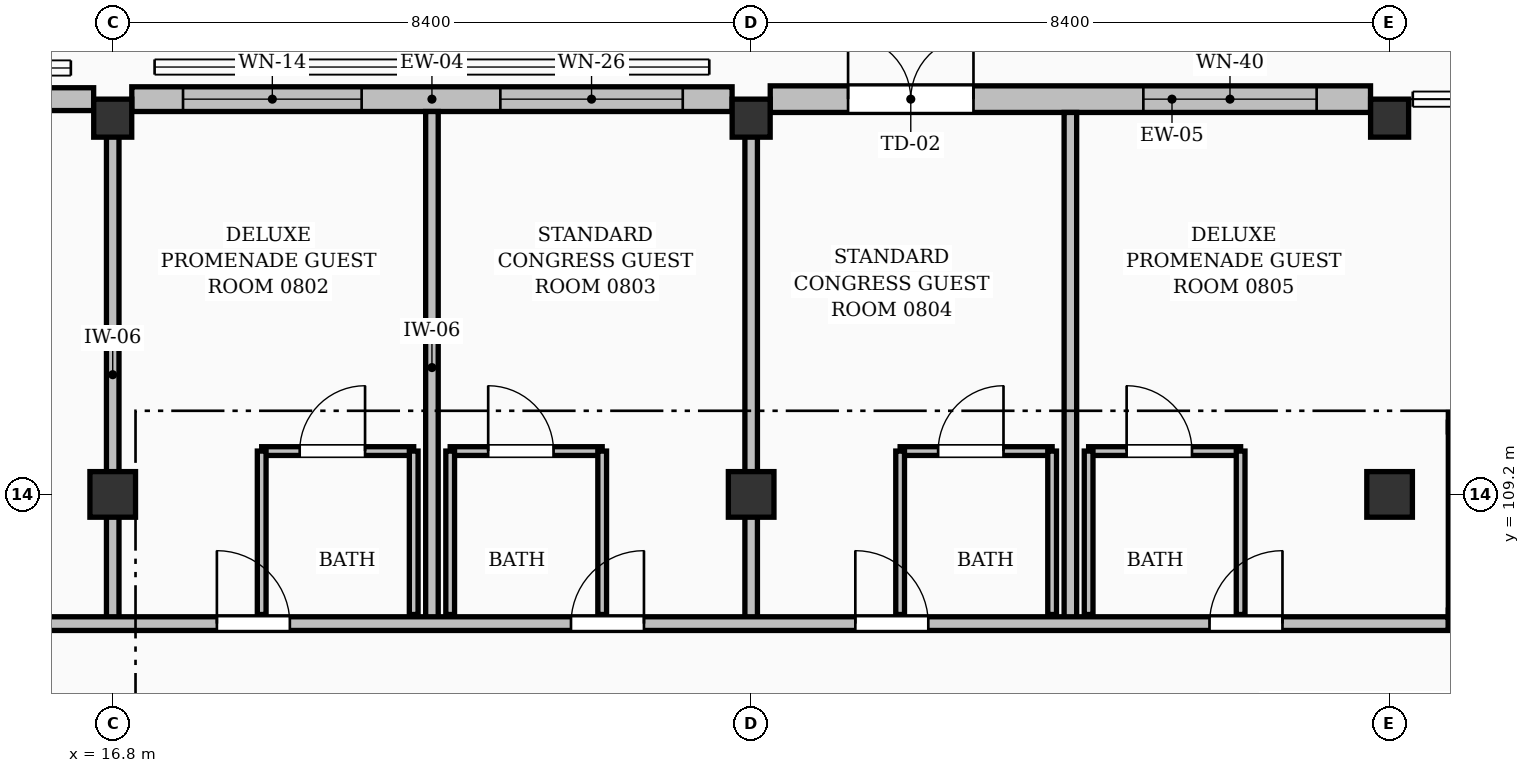
"""IFC4 building model, lengths in metres.
Left out: names, types, materials, properties, quantities, classifications, styles, units other than length and angle.
Written with IfcOpenShell. Run it as: python <this file> out.ifc"""

import sys

from ifc_helpers import new_model, si_unit, direction, frame, frame_2d, origin, origin_2d, place, context, subcontext, project, spatial, rectangle, extrude, element, fill, save


model = new_model("IFC4")
c1 = context("Model", 3, precision=1e-05, world=origin(), true_north=direction((0.0, 1.0)))
c2 = subcontext(c1, "Body", "Model", "MODEL_VIEW")
j1 = project(units=[si_unit("LENGTHUNIT", "METRE"), si_unit("PLANEANGLEUNIT", "RADIAN")], contexts=[c1])
p1 = place(None, origin())
s1 = spatial("IfcSite", under=j1, at=p1, CompositionType="ELEMENT")
p2 = place(p1, origin())
s2 = spatial("IfcBuilding", under=s1, at=p2, CompositionType="ELEMENT")
p3 = place(p2, frame((0.0, 0.0, 28.56)))
s3 = spatial("IfcBuildingStorey", under=s2, at=p3, CompositionType="ELEMENT", Elevation=28.56)
p4 = place(p3, frame((16.8, 109.2, 0.0), z_axis=(0.0, 0.0, 1.0), x_axis=(1.0, 0.0, 0.0)))
e1 = element("IfcColumn", 1, at=p4, inside=s3, PredefinedType="COLUMN", context=c2, shape_type="SweptSolid", body=[
    extrude(rectangle(XDim=0.6, YDim=0.6, at=origin_2d()), origin(), (0.0, 0.0, 1.0), 3.36),
])
p5 = place(p3, frame((16.8, 114.15, -0.315), z_axis=(0.0, 0.0, 1.0), x_axis=(1.0, 0.0, 0.0)))
e2 = element("IfcColumn", 2, at=p5, inside=s3, PredefinedType="COLUMN", context=c2, shape_type="SweptSolid", body=[
    extrude(rectangle(XDim=0.5, YDim=0.5, at=origin_2d()), origin(), (0.0, 0.0, 1.0), 3.675),
])
p6 = place(p3, frame((25.2, 109.2, 0.0), z_axis=(0.0, 0.0, 1.0), x_axis=(1.0, 0.0, 0.0)))
e3 = element("IfcColumn", 3, at=p6, inside=s3, PredefinedType="COLUMN", context=c2, shape_type="SweptSolid", body=[
    extrude(rectangle(XDim=0.6, YDim=0.6, at=origin_2d()), origin(), (0.0, 0.0, 1.0), 3.36),
])
p7 = place(p3, frame((25.2, 114.15, -0.315), z_axis=(0.0, 0.0, 1.0), x_axis=(1.0, 0.0, 0.0)))
e4 = element("IfcColumn", 4, at=p7, inside=s3, PredefinedType="COLUMN", context=c2, shape_type="SweptSolid", body=[
    extrude(rectangle(XDim=0.5, YDim=0.5, at=origin_2d()), origin(), (0.0, 0.0, 1.0), 3.675),
])
p8 = place(p3, frame((33.6, 109.2, 0.0), z_axis=(0.0, 0.0, 1.0), x_axis=(1.0, 0.0, 0.0)))
e5 = element("IfcColumn", 5, at=p8, inside=s3, PredefinedType="COLUMN", context=c2, shape_type="SweptSolid", body=[
    extrude(rectangle(XDim=0.6, YDim=0.6, at=origin_2d()), origin(), (0.0, 0.0, 1.0), 3.36),
])
p9 = place(p3, frame((33.6, 114.15, -0.315), z_axis=(0.0, 0.0, 1.0), x_axis=(1.0, 0.0, 0.0)))
e6 = element("IfcColumn", 6, at=p9, inside=s3, PredefinedType="COLUMN", context=c2, shape_type="SweptSolid", body=[
    extrude(rectangle(XDim=0.5, YDim=0.5, at=origin_2d()), origin(), (0.0, 0.0, 1.0), 3.675),
])
p10 = place(p3, frame((8.651, 114.4, 0.0), z_axis=(0.0, 0.0, 1.0), x_axis=(1.0, 0.0, 0.0)))
e7 = element("IfcWall", 7, at=p10, inside=s3, PredefinedType="SOLIDWALL", context=c2, shape_type="SweptSolid", body=[
    extrude(rectangle(XDim=7.898, YDim=0.3, at=frame_2d((3.949, 0.0))), origin(), (0.0, 0.0, 1.0), 2.494),
])
p11 = place(p10, frame((0.524, 0.0, 0.25)))
e8 = element("IfcOpeningElement", 8, at=p11, cuts=e7, PredefinedType="OPENING", context=c2, shape_type="SweptSolid", body=[
    extrude(rectangle(XDim=2.65, YDim=1.95, at=frame_2d((1.325, 0.975))), frame((0.0, 0.16, 0.0), z_axis=(0.0, -1.0, 0.0), x_axis=(1.0, 0.0, 0.0)), (0.0, 0.0, 1.0), 0.32),
])
p12 = place(p10, frame((4.824, 0.0, 0.25)))
e9 = element("IfcOpeningElement", 9, at=p12, cuts=e7, PredefinedType="OPENING", context=c2, shape_type="SweptSolid", body=[
    extrude(rectangle(XDim=2.45, YDim=2.05, at=frame_2d((1.225, 1.025))), frame((0.0, 0.16, 0.0), z_axis=(0.0, -1.0, 0.0), x_axis=(1.0, 0.0, 0.0)), (0.0, 0.0, 1.0), 0.32),
])
p13 = place(p3, frame((17.051, 114.4, 0.0), z_axis=(0.0, 0.0, 1.0), x_axis=(1.0, 0.0, 0.0)))
e10 = element("IfcWall", 10, at=p13, inside=s3, PredefinedType="SOLIDWALL", context=c2, shape_type="SweptSolid", body=[
    extrude(rectangle(XDim=7.898, YDim=0.325, at=frame_2d((3.949, 0.0))), origin(), (0.0, 0.0, 1.0), 2.494),
])
p14 = place(p13, frame((0.674, 0.0, 0.25)))
e11 = element("IfcOpeningElement", 11, at=p14, cuts=e10, PredefinedType="OPENING", context=c2, shape_type="SweptSolid", body=[
    extrude(rectangle(XDim=2.35, YDim=2.05, at=frame_2d((1.175, 1.025))), frame((0.0, 0.172, 0.0), z_axis=(0.0, -1.0, 0.0), x_axis=(1.0, 0.0, 0.0)), (0.0, 0.0, 1.0), 0.345),
])
p15 = place(p13, frame((4.849, 0.0, 0.25)))
e12 = element("IfcOpeningElement", 12, at=p15, cuts=e10, PredefinedType="OPENING", context=c2, shape_type="SweptSolid", body=[
    extrude(rectangle(XDim=2.4, YDim=1.75, at=frame_2d((1.2, 0.875))), frame((0.0, 0.172, 0.0), z_axis=(0.0, -1.0, 0.0), x_axis=(1.0, 0.0, 0.0)), (0.0, 0.0, 1.0), 0.345),
])
p16 = place(p3, frame((25.451, 114.4, 0.0), z_axis=(0.0, 0.0, 1.0), x_axis=(1.0, 0.0, 0.0)))
e13 = element("IfcWall", 13, at=p16, inside=s3, PredefinedType="SOLIDWALL", context=c2, shape_type="SweptSolid", body=[
    extrude(rectangle(XDim=7.898, YDim=0.35, at=frame_2d((3.949, 0.0))), origin(), (0.0, 0.0, 1.0), 2.494),
])
p17 = place(p16, frame((1.024, 0.0, 0.0)))
e14 = element("IfcOpeningElement", 14, at=p17, cuts=e13, PredefinedType="OPENING", context=c2, shape_type="SweptSolid", body=[
    extrude(rectangle(XDim=1.65, YDim=2.08, at=frame_2d((0.825, 1.04))), frame((0.0, 0.185, 0.0), z_axis=(0.0, -1.0, 0.0), x_axis=(1.0, 0.0, 0.0)), (0.0, 0.0, 1.0), 0.37),
])
p18 = place(p16, frame((4.909, 0.0, 0.25)))
e15 = element("IfcOpeningElement", 15, at=p18, cuts=e13, PredefinedType="OPENING", context=c2, shape_type="SweptSolid", body=[
    extrude(rectangle(XDim=2.28, YDim=2.0, at=frame_2d((1.14, 1.0))), frame((0.0, 0.185, 0.0), z_axis=(0.0, -1.0, 0.0), x_axis=(1.0, 0.0, 0.0)), (0.0, 0.0, 1.0), 0.37),
])
p19 = place(p3, frame((34.373, 107.55, 0.0), z_axis=(0.0, 0.0, 1.0), x_axis=(1.0, 0.0, 0.0)))
e16 = element("IfcWall", 16, at=p19, inside=s3, PredefinedType="SOLIDWALL", context=c2, shape_type="SweptSolid", body=[
    extrude(rectangle(XDim=2.455, YDim=0.255, at=frame_2d((1.228, 0.0))), origin(), (0.0, 0.0, 1.0), 3.12),
])
p20 = place(p19, frame((0.677, 0.0, 0.0)))
e17 = element("IfcOpeningElement", 17, at=p20, cuts=e16, PredefinedType="OPENING", context=c2, shape_type="SweptSolid", body=[
    extrude(rectangle(XDim=1.1, YDim=2.15, at=frame_2d((0.55, 1.075))), frame((0.0, 0.137, 0.0), z_axis=(0.0, -1.0, 0.0), x_axis=(1.0, 0.0, 0.0)), (0.0, 0.0, 1.0), 0.275),
])
p21 = place(p3, frame((34.373, 110.15, 0.0), z_axis=(0.0, 0.0, 1.0), x_axis=(1.0, 0.0, 0.0)))
e18 = element("IfcWall", 18, at=p21, inside=s3, PredefinedType="SOLIDWALL", context=c2, shape_type="SweptSolid", body=[
    extrude(rectangle(XDim=2.455, YDim=0.255, at=frame_2d((1.228, 0.0))), origin(), (0.0, 0.0, 1.0), 3.12),
])
p22 = place(p3, frame((34.5, 107.55, 0.0), z_axis=(0.0, 0.0, 1.0), x_axis=(0.0, 1.0, 0.0)))
e19 = element("IfcWall", 19, at=p22, inside=s3, PredefinedType="SOLIDWALL", context=c2, shape_type="SweptSolid", body=[
    extrude(rectangle(XDim=2.6, YDim=0.255, at=frame_2d((1.3, 0.0))), origin(), (0.0, 0.0, 1.0), 3.12),
])
p23 = place(p3, frame((18.76, 109.77, 0.0), z_axis=(0.0, 0.0, 1.0), x_axis=(1.0, 0.0, 0.0)))
e20 = element("IfcWall", 20, at=p23, inside=s3, PredefinedType="PARTITIONING", context=c2, shape_type="SweptSolid", body=[
    extrude(rectangle(XDim=2.0, YDim=0.115, at=frame_2d((1.0, 0.0))), origin(), (0.0, 0.0, 1.0), 3.12),
])
p24 = place(p23, frame((0.5, 0.0, 0.0)))
e21 = element("IfcOpeningElement", 21, at=p24, cuts=e20, PredefinedType="OPENING", context=c2, shape_type="SweptSolid", body=[
    extrude(rectangle(XDim=0.86, YDim=2.05, at=frame_2d((0.43, 1.025))), frame((0.0, 0.067, 0.0), z_axis=(0.0, -1.0, 0.0), x_axis=(1.0, 0.0, 0.0)), (0.0, 0.0, 1.0), 0.135),
])
for number, where, z_axis, x_axis in (
    (22, (18.76, 107.62, 0.0), (0.0, 0.0, 1.0), (0.0, 1.0, 0.0)),
    (23, (20.76, 107.62, 0.0), (0.0, 0.0, 1.0), (0.0, 1.0, 0.0)),
):
    element("IfcWall", number, at=place(p3, frame(where, z_axis=z_axis, x_axis=x_axis)), inside=s3, PredefinedType="PARTITIONING", context=c2, shape_type="SweptSolid", body=[
        extrude(rectangle(XDim=2.15, YDim=0.115, at=frame_2d((1.075, 0.0))), origin(), (0.0, 0.0, 1.0), 3.12),
    ])
p25 = place(p3, frame((21.24, 109.77, 0.0), z_axis=(0.0, 0.0, 1.0), x_axis=(1.0, 0.0, 0.0)))
e24 = element("IfcWall", 24, at=p25, inside=s3, PredefinedType="PARTITIONING", context=c2, shape_type="SweptSolid", body=[
    extrude(rectangle(XDim=2.0, YDim=0.115, at=frame_2d((1.0, 0.0))), origin(), (0.0, 0.0, 1.0), 3.12),
])
p26 = place(p25, frame((0.5, 0.0, 0.0)))
e25 = element("IfcOpeningElement", 25, at=p26, cuts=e24, PredefinedType="OPENING", context=c2, shape_type="SweptSolid", body=[
    extrude(rectangle(XDim=0.86, YDim=2.05, at=frame_2d((0.43, 1.025))), frame((0.0, 0.067, 0.0), z_axis=(0.0, -1.0, 0.0), x_axis=(1.0, 0.0, 0.0)), (0.0, 0.0, 1.0), 0.135),
])
for number, where, z_axis, x_axis in (
    (26, (21.24, 107.62, 0.0), (0.0, 0.0, 1.0), (0.0, 1.0, 0.0)),
    (27, (23.24, 107.62, 0.0), (0.0, 0.0, 1.0), (0.0, 1.0, 0.0)),
):
    element("IfcWall", number, at=place(p3, frame(where, z_axis=z_axis, x_axis=x_axis)), inside=s3, PredefinedType="PARTITIONING", context=c2, shape_type="SweptSolid", body=[
        extrude(rectangle(XDim=2.15, YDim=0.115, at=frame_2d((1.075, 0.0))), origin(), (0.0, 0.0, 1.0), 3.12),
    ])
p27 = place(p3, frame((21.0, 107.5, 0.0), z_axis=(0.0, 0.0, 1.0), x_axis=(0.0, 1.0, 0.0)))
e28 = element("IfcWall", 28, at=p27, inside=s3, PredefinedType="PARTITIONING", context=c2, shape_type="SweptSolid", body=[
    extrude(rectangle(XDim=6.738, YDim=0.165, at=frame_2d((3.369, 0.0))), origin(), (0.0, 0.0, 1.0), 3.12),
])
p28 = place(p3, frame((16.8, 107.5, 0.0), z_axis=(0.0, 0.0, 1.0), x_axis=(0.0, 1.0, 0.0)))
e29 = element("IfcWall", 29, at=p28, inside=s3, PredefinedType="PARTITIONING", context=c2, shape_type="SweptSolid", body=[
    extrude(rectangle(XDim=6.55, YDim=0.165, at=frame_2d((3.275, 0.0))), origin(), (0.0, 0.0, 1.0), 2.41),
])
p29 = place(p3, frame((27.16, 109.77, 0.0), z_axis=(0.0, 0.0, 1.0), x_axis=(1.0, 0.0, 0.0)))
e30 = element("IfcWall", 30, at=p29, inside=s3, PredefinedType="PARTITIONING", context=c2, shape_type="SweptSolid", body=[
    extrude(rectangle(XDim=2.0, YDim=0.115, at=frame_2d((1.0, 0.0))), origin(), (0.0, 0.0, 1.0), 3.12),
])
p30 = place(p29, frame((0.5, 0.0, 0.0)))
e31 = element("IfcOpeningElement", 31, at=p30, cuts=e30, PredefinedType="OPENING", context=c2, shape_type="SweptSolid", body=[
    extrude(rectangle(XDim=0.86, YDim=2.05, at=frame_2d((0.43, 1.025))), frame((0.0, 0.067, 0.0), z_axis=(0.0, -1.0, 0.0), x_axis=(1.0, 0.0, 0.0)), (0.0, 0.0, 1.0), 0.135),
])
p31 = place(p3, frame((27.16, 107.62, 0.0), z_axis=(0.0, 0.0, 1.0), x_axis=(0.0, 1.0, 0.0)))
e32 = element("IfcWall", 32, at=p31, inside=s3, PredefinedType="PARTITIONING", context=c2, shape_type="SweptSolid", body=[
    extrude(rectangle(XDim=2.15, YDim=0.115, at=frame_2d((1.075, 0.0))), origin(), (0.0, 0.0, 1.0), 2.642),
])
p32 = place(p3, frame((29.16, 107.62, 0.0), z_axis=(0.0, 0.0, 1.0), x_axis=(0.0, 1.0, 0.0)))
e33 = element("IfcWall", 33, at=p32, inside=s3, PredefinedType="PARTITIONING", context=c2, shape_type="SweptSolid", body=[
    extrude(rectangle(XDim=2.15, YDim=0.115, at=frame_2d((1.075, 0.0))), origin(), (0.0, 0.0, 1.0), 3.12),
])
p33 = place(p3, frame((29.64, 109.77, 0.0), z_axis=(0.0, 0.0, 1.0), x_axis=(1.0, 0.0, 0.0)))
e34 = element("IfcWall", 34, at=p33, inside=s3, PredefinedType="PARTITIONING", context=c2, shape_type="SweptSolid", body=[
    extrude(rectangle(XDim=2.0, YDim=0.115, at=frame_2d((1.0, 0.0))), origin(), (0.0, 0.0, 1.0), 3.12),
])
p34 = place(p33, frame((0.5, 0.0, 0.0)))
e35 = element("IfcOpeningElement", 35, at=p34, cuts=e34, PredefinedType="OPENING", context=c2, shape_type="SweptSolid", body=[
    extrude(rectangle(XDim=0.86, YDim=2.05, at=frame_2d((0.43, 1.025))), frame((0.0, 0.067, 0.0), z_axis=(0.0, -1.0, 0.0), x_axis=(1.0, 0.0, 0.0)), (0.0, 0.0, 1.0), 0.135),
])
p35 = place(p3, frame((29.64, 107.62, 0.0), z_axis=(0.0, 0.0, 1.0), x_axis=(0.0, 1.0, 0.0)))
e36 = element("IfcWall", 36, at=p35, inside=s3, PredefinedType="PARTITIONING", context=c2, shape_type="SweptSolid", body=[
    extrude(rectangle(XDim=2.15, YDim=0.115, at=frame_2d((1.075, 0.0))), origin(), (0.0, 0.0, 1.0), 3.12),
])
p36 = place(p3, frame((31.64, 107.62, 0.0), z_axis=(0.0, 0.0, 1.0), x_axis=(0.0, 1.0, 0.0)))
e37 = element("IfcWall", 37, at=p36, inside=s3, PredefinedType="PARTITIONING", context=c2, shape_type="SweptSolid", body=[
    extrude(rectangle(XDim=2.15, YDim=0.115, at=frame_2d((1.075, 0.0))), origin(), (0.0, 0.0, 1.0), 2.642),
])
p37 = place(p3, frame((29.4, 107.5, 0.0), z_axis=(0.0, 0.0, 1.0), x_axis=(0.0, 1.0, 0.0)))
e38 = element("IfcWall", 38, at=p37, inside=s3, PredefinedType="PARTITIONING", context=c2, shape_type="SweptSolid", body=[
    extrude(rectangle(XDim=6.725, YDim=0.165, at=frame_2d((3.363, 0.0))), origin(), (0.0, 0.0, 1.0), 3.12),
])
p38 = place(p3, frame((25.2, 107.5, 0.0), z_axis=(0.0, 0.0, 1.0), x_axis=(0.0, 1.0, 0.0)))
e39 = element("IfcWall", 39, at=p38, inside=s3, PredefinedType="PARTITIONING", context=c2, shape_type="SweptSolid", body=[
    extrude(rectangle(XDim=6.55, YDim=0.165, at=frame_2d((3.275, 0.0))), origin(), (0.0, 0.0, 1.0), 2.41),
])
p39 = place(p3, frame((8.562, 107.5, 0.0), z_axis=(0.0, 0.0, 1.0), x_axis=(1.0, 0.0, 0.0)))
e40 = element("IfcWall", 40, at=p39, inside=s3, PredefinedType="PARTITIONING", context=c2, shape_type="SweptSolid", body=[
    extrude(rectangle(XDim=25.808, YDim=0.18, at=frame_2d((12.904, 0.0))), origin(), (0.0, 0.0, 1.0), 3.12),
])
p40 = place(p39, frame((1.338, 0.0, 0.0)))
e41 = element("IfcOpeningElement", 41, at=p40, cuts=e40, PredefinedType="OPENING", context=c2, shape_type="SweptSolid", body=[
    extrude(rectangle(XDim=1.02, YDim=2.15, at=frame_2d((0.51, 1.075))), frame((0.0, 0.1, 0.0), z_axis=(0.0, -1.0, 0.0), x_axis=(1.0, 0.0, 0.0)), (0.0, 0.0, 1.0), 0.2),
])
p41 = place(p39, frame((9.608, 0.0, 0.0)))
e42 = element("IfcOpeningElement", 42, at=p41, cuts=e40, PredefinedType="OPENING", context=c2, shape_type="SweptSolid", body=[
    extrude(rectangle(XDim=0.96, YDim=2.15, at=frame_2d((0.48, 1.075))), frame((0.0, 0.1, 0.0), z_axis=(0.0, -1.0, 0.0), x_axis=(1.0, 0.0, 0.0)), (0.0, 0.0, 1.0), 0.2),
])
p42 = place(p39, frame((14.267, 0.0, 0.0)))
e43 = element("IfcOpeningElement", 43, at=p42, cuts=e40, PredefinedType="OPENING", context=c2, shape_type="SweptSolid", body=[
    extrude(rectangle(XDim=0.96, YDim=2.15, at=frame_2d((0.48, 1.075))), frame((0.0, 0.1, 0.0), z_axis=(0.0, -1.0, 0.0), x_axis=(1.0, 0.0, 0.0)), (0.0, 0.0, 1.0), 0.2),
])
p43 = place(p39, frame((18.008, 0.0, 0.0)))
e44 = element("IfcOpeningElement", 44, at=p43, cuts=e40, PredefinedType="OPENING", context=c2, shape_type="SweptSolid", body=[
    extrude(rectangle(XDim=0.96, YDim=2.15, at=frame_2d((0.48, 1.075))), frame((0.0, 0.1, 0.0), z_axis=(0.0, -1.0, 0.0), x_axis=(1.0, 0.0, 0.0)), (0.0, 0.0, 1.0), 0.2),
])
p44 = place(p39, frame((22.668, 0.0, 0.0)))
e45 = element("IfcOpeningElement", 45, at=p44, cuts=e40, PredefinedType="OPENING", context=c2, shape_type="SweptSolid", body=[
    extrude(rectangle(XDim=0.96, YDim=2.15, at=frame_2d((0.48, 1.075))), frame((0.0, 0.1, 0.0), z_axis=(0.0, -1.0, 0.0), x_axis=(1.0, 0.0, 0.0)), (0.0, 0.0, 1.0), 0.2),
])
p45 = place(p14, origin())
e46 = element("IfcWindow", 46, at=p45, inside=s3, PartitioningType="DOUBLE_PANEL_VERTICAL", PredefinedType="WINDOW", context=c2, shape_type="SweptSolid", body=[
    extrude(rectangle(XDim=2.35, YDim=2.05, at=frame_2d((1.175, 1.025))), frame((0.0, 0.03, 0.0), z_axis=(0.0, -1.0, 0.0), x_axis=(1.0, 0.0, 0.0)), (0.0, 0.0, 1.0), 0.06),
])
fill(e11, e46)
p46 = place(p15, origin())
e47 = element("IfcWindow", 47, at=p46, inside=s3, PartitioningType="DOUBLE_PANEL_VERTICAL", PredefinedType="WINDOW", context=c2, shape_type="SweptSolid", body=[
    extrude(rectangle(XDim=2.4, YDim=1.75, at=frame_2d((1.2, 0.875))), frame((0.0, 0.03, 0.0), z_axis=(0.0, -1.0, 0.0), x_axis=(1.0, 0.0, 0.0)), (0.0, 0.0, 1.0), 0.06),
])
fill(e12, e47)
p47 = place(p17, origin())
e48 = element("IfcDoor", 48, at=p47, inside=s3, OperationType="DOUBLE_DOOR_SINGLE_SWING", PredefinedType="DOOR", context=c2, shape_type="SweptSolid", body=[
    extrude(rectangle(XDim=1.65, YDim=2.08, at=frame_2d((0.825, 1.04))), frame((0.0, 0.025, 0.0), z_axis=(0.0, -1.0, 0.0), x_axis=(1.0, 0.0, 0.0)), (0.0, 0.0, 1.0), 0.05),
])
fill(e14, e48)
p48 = place(p18, origin())
e49 = element("IfcWindow", 49, at=p48, inside=s3, PartitioningType="DOUBLE_PANEL_VERTICAL", PredefinedType="WINDOW", context=c2, shape_type="SweptSolid", body=[
    extrude(rectangle(XDim=2.28, YDim=2.0, at=frame_2d((1.14, 1.0))), frame((0.0, 0.03, 0.0), z_axis=(0.0, -1.0, 0.0), x_axis=(1.0, 0.0, 0.0)), (0.0, 0.0, 1.0), 0.06),
])
fill(e15, e49)
p49 = place(p24, origin())
e50 = element("IfcDoor", 50, at=p49, inside=s3, OperationType="SINGLE_SWING_RIGHT", PredefinedType="DOOR", context=c2, shape_type="SweptSolid", body=[
    extrude(rectangle(XDim=0.86, YDim=2.05, at=frame_2d((0.43, 1.025))), frame((0.0, 0.025, 0.0), z_axis=(0.0, -1.0, 0.0), x_axis=(1.0, 0.0, 0.0)), (0.0, 0.0, 1.0), 0.05),
])
fill(e21, e50)
p50 = place(p26, origin())
e51 = element("IfcDoor", 51, at=p50, inside=s3, OperationType="SINGLE_SWING_LEFT", PredefinedType="DOOR", context=c2, shape_type="SweptSolid", body=[
    extrude(rectangle(XDim=0.86, YDim=2.05, at=frame_2d((0.43, 1.025))), frame((0.0, 0.025, 0.0), z_axis=(0.0, -1.0, 0.0), x_axis=(1.0, 0.0, 0.0)), (0.0, 0.0, 1.0), 0.05),
])
fill(e25, e51)
p51 = place(p30, origin())
e52 = element("IfcDoor", 52, at=p51, inside=s3, OperationType="SINGLE_SWING_RIGHT", PredefinedType="DOOR", context=c2, shape_type="SweptSolid", body=[
    extrude(rectangle(XDim=0.86, YDim=2.05, at=frame_2d((0.43, 1.025))), frame((0.0, 0.025, 0.0), z_axis=(0.0, -1.0, 0.0), x_axis=(1.0, 0.0, 0.0)), (0.0, 0.0, 1.0), 0.05),
])
fill(e31, e52)
p52 = place(p34, origin())
e53 = element("IfcDoor", 53, at=p52, inside=s3, OperationType="SINGLE_SWING_LEFT", PredefinedType="DOOR", context=c2, shape_type="SweptSolid", body=[
    extrude(rectangle(XDim=0.86, YDim=2.05, at=frame_2d((0.43, 1.025))), frame((0.0, 0.025, 0.0), z_axis=(0.0, -1.0, 0.0), x_axis=(1.0, 0.0, 0.0)), (0.0, 0.0, 1.0), 0.05),
])
fill(e35, e53)
p53 = place(p41, origin())
e54 = element("IfcDoor", 54, at=p53, inside=s3, OperationType="SINGLE_SWING_LEFT", PredefinedType="DOOR", context=c2, shape_type="SweptSolid", body=[
    extrude(rectangle(XDim=0.96, YDim=2.15, at=frame_2d((0.48, 1.075))), frame((0.0, 0.025, 0.0), z_axis=(0.0, -1.0, 0.0), x_axis=(1.0, 0.0, 0.0)), (0.0, 0.0, 1.0), 0.05),
])
fill(e42, e54)
p54 = place(p42, origin())
e55 = element("IfcDoor", 55, at=p54, inside=s3, OperationType="SINGLE_SWING_RIGHT", PredefinedType="DOOR", context=c2, shape_type="SweptSolid", body=[
    extrude(rectangle(XDim=0.96, YDim=2.15, at=frame_2d((0.48, 1.075))), frame((0.0, 0.025, 0.0), z_axis=(0.0, -1.0, 0.0), x_axis=(1.0, 0.0, 0.0)), (0.0, 0.0, 1.0), 0.05),
])
fill(e43, e55)
p55 = place(p43, origin())
e56 = element("IfcDoor", 56, at=p55, inside=s3, OperationType="SINGLE_SWING_LEFT", PredefinedType="DOOR", context=c2, shape_type="SweptSolid", body=[
    extrude(rectangle(XDim=0.96, YDim=2.15, at=frame_2d((0.48, 1.075))), frame((0.0, 0.025, 0.0), z_axis=(0.0, -1.0, 0.0), x_axis=(1.0, 0.0, 0.0)), (0.0, 0.0, 1.0), 0.05),
])
fill(e44, e56)
p56 = place(p44, origin())
e57 = element("IfcDoor", 57, at=p56, inside=s3, OperationType="SINGLE_SWING_RIGHT", PredefinedType="DOOR", context=c2, shape_type="SweptSolid", body=[
    extrude(rectangle(XDim=0.96, YDim=2.15, at=frame_2d((0.48, 1.075))), frame((0.0, 0.025, 0.0), z_axis=(0.0, -1.0, 0.0), x_axis=(1.0, 0.0, 0.0)), (0.0, 0.0, 1.0), 0.05),
])
fill(e45, e57)
save(model, sys.argv[1])
